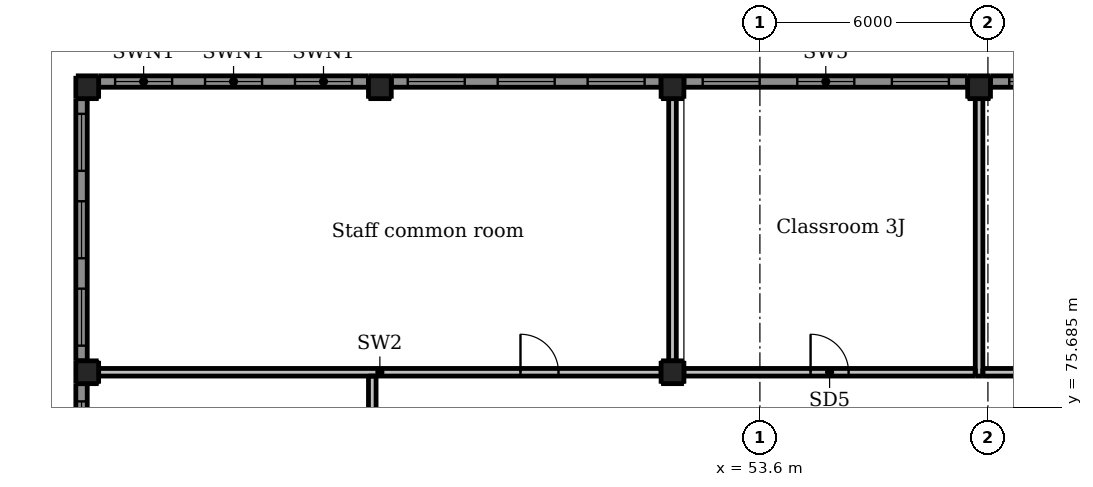
"""IFC4 building model, lengths in metres.
Left out: names, types, materials, properties, quantities, classifications, styles, units other than length and angle.
Written with IfcOpenShell. Run it as: python <this file> out.ifc"""

import sys

from ifc_helpers import new_model, si_unit, direction, frame, frame_2d, origin, origin_2d, place, context, subcontext, project, spatial, rectangle, extrude, element, fill, save


model = new_model("IFC4")
c1 = context("Model", 3, precision=1e-05, world=origin(), true_north=direction((0.0, 1.0)))
c2 = subcontext(c1, "Body", "Model", "MODEL_VIEW")
j1 = project(units=[si_unit("LENGTHUNIT", "METRE"), si_unit("PLANEANGLEUNIT", "RADIAN")], contexts=[c1])
p1 = place(None, origin())
s1 = spatial("IfcSite", under=j1, at=p1, CompositionType="ELEMENT")
p2 = place(p1, origin())
s2 = spatial("IfcBuilding", under=s1, at=p2, CompositionType="ELEMENT")
p3 = place(p2, frame((0.0, 0.0, 14.5)))
s3 = spatial("IfcBuildingStorey", under=s2, at=p3, CompositionType="ELEMENT", Elevation=14.5)
for number, where, z_axis, x_axis in (
    (1, (35.9, 76.6, -0.3), (0.0, 0.0, 1.0), (1.0, 0.0, 0.0)),
    (2, (51.3, 76.6, -0.3), (0.0, 0.0, 1.0), (1.0, 0.0, 0.0)),
    (3, (35.9, 84.1, -0.3), (0.0, 0.0, 1.0), (1.0, 0.0, 0.0)),
    (4, (51.3, 84.1, -0.3), (0.0, 0.0, 1.0), (1.0, 0.0, 0.0)),
    (5, (43.6, 84.1, -0.3), (0.0, 0.0, 1.0), (1.0, 0.0, 0.0)),
    (6, (59.367, 84.1, -0.3), (0.0, 0.0, 1.0), (1.0, 0.0, 0.0)),
):
    element("IfcColumn", number, at=place(p3, frame(where, z_axis=z_axis, x_axis=x_axis)), inside=s3, PredefinedType="COLUMN", context=c2, shape_type="SweptSolid", body=[
        extrude(rectangle(XDim=0.6, YDim=0.6, at=origin_2d()), origin(), (0.0, 0.0, 1.0), 4.5),
    ])
p4 = place(p3, frame((35.75, 69.0, 0.0), z_axis=(0.0, 0.0, 1.0), x_axis=(0.0, 1.0, 0.0)))
e7 = element("IfcWall", 7, at=p4, inside=s3, PredefinedType="SOLIDWALL", context=c2, shape_type="SweptSolid", body=[
    extrude(rectangle(XDim=7.3, YDim=0.3, at=frame_2d((3.65, 0.0))), origin(), (0.0, 0.0, 1.0), 3.3),
])
p5 = place(p4, frame((0.467, 0.0, 0.9)))
e8 = element("IfcOpeningElement", 8, at=p5, cuts=e7, PredefinedType="OPENING", context=c2, shape_type="SweptSolid", body=[
    extrude(rectangle(XDim=1.5, YDim=1.5, at=frame_2d((0.75, 0.75))), frame((0.0, 0.16, 0.0), z_axis=(0.0, -1.0, 0.0), x_axis=(1.0, 0.0, 0.0)), (0.0, 0.0, 1.0), 0.32),
])
p6 = place(p4, frame((2.9, 0.0, 0.9)))
e9 = element("IfcOpeningElement", 9, at=p6, cuts=e7, PredefinedType="OPENING", context=c2, shape_type="SweptSolid", body=[
    extrude(rectangle(XDim=1.5, YDim=1.5, at=frame_2d((0.75, 0.75))), frame((0.0, 0.16, 0.0), z_axis=(0.0, -1.0, 0.0), x_axis=(1.0, 0.0, 0.0)), (0.0, 0.0, 1.0), 0.32),
])
p7 = place(p4, frame((5.333, 0.0, 0.9)))
e10 = element("IfcOpeningElement", 10, at=p7, cuts=e7, PredefinedType="OPENING", context=c2, shape_type="SweptSolid", body=[
    extrude(rectangle(XDim=1.5, YDim=1.5, at=frame_2d((0.75, 0.75))), frame((0.0, 0.16, 0.0), z_axis=(0.0, -1.0, 0.0), x_axis=(1.0, 0.0, 0.0)), (0.0, 0.0, 1.0), 0.32),
])
p8 = place(p3, frame((35.75, 76.9, 0.0), z_axis=(0.0, 0.0, 1.0), x_axis=(0.0, 1.0, 0.0)))
e11 = element("IfcWall", 11, at=p8, inside=s3, PredefinedType="SOLIDWALL", context=c2, shape_type="SweptSolid", body=[
    extrude(rectangle(XDim=6.9, YDim=0.3, at=frame_2d((3.45, 0.0))), origin(), (0.0, 0.0, 1.0), 3.3),
])
p9 = place(p8, frame((0.4, 0.0, 0.9)))
e12 = element("IfcOpeningElement", 12, at=p9, cuts=e11, PredefinedType="OPENING", context=c2, shape_type="SweptSolid", body=[
    extrude(rectangle(XDim=1.5, YDim=1.5, at=frame_2d((0.75, 0.75))), frame((0.0, 0.16, 0.0), z_axis=(0.0, -1.0, 0.0), x_axis=(1.0, 0.0, 0.0)), (0.0, 0.0, 1.0), 0.32),
])
p10 = place(p8, frame((2.7, 0.0, 0.9)))
e13 = element("IfcOpeningElement", 13, at=p10, cuts=e11, PredefinedType="OPENING", context=c2, shape_type="SweptSolid", body=[
    extrude(rectangle(XDim=1.5, YDim=1.5, at=frame_2d((0.75, 0.75))), frame((0.0, 0.16, 0.0), z_axis=(0.0, -1.0, 0.0), x_axis=(1.0, 0.0, 0.0)), (0.0, 0.0, 1.0), 0.32),
])
p11 = place(p8, frame((5.0, 0.0, 0.9)))
e14 = element("IfcOpeningElement", 14, at=p11, cuts=e11, PredefinedType="OPENING", context=c2, shape_type="SweptSolid", body=[
    extrude(rectangle(XDim=1.5, YDim=1.5, at=frame_2d((0.75, 0.75))), frame((0.0, 0.16, 0.0), z_axis=(0.0, -1.0, 0.0), x_axis=(1.0, 0.0, 0.0)), (0.0, 0.0, 1.0), 0.32),
])
p12 = place(p3, frame((36.2, 84.25, 0.0), z_axis=(0.0, 0.0, 1.0), x_axis=(1.0, 0.0, 0.0)))
e15 = element("IfcWall", 15, at=p12, inside=s3, PredefinedType="SOLIDWALL", context=c2, shape_type="SweptSolid", body=[
    extrude(rectangle(XDim=7.1, YDim=0.3, at=frame_2d((3.55, 0.0))), origin(), (0.0, 0.0, 1.0), 3.3),
])
p13 = place(p12, frame((0.433, 0.0, 0.9)))
e16 = element("IfcOpeningElement", 16, at=p13, cuts=e15, PredefinedType="OPENING", context=c2, shape_type="SweptSolid", body=[
    extrude(rectangle(XDim=1.5, YDim=1.5, at=frame_2d((0.75, 0.75))), frame((0.0, 0.16, 0.0), z_axis=(0.0, -1.0, 0.0), x_axis=(1.0, 0.0, 0.0)), (0.0, 0.0, 1.0), 0.32),
])
p14 = place(p12, frame((2.8, 0.0, 0.9)))
e17 = element("IfcOpeningElement", 17, at=p14, cuts=e15, PredefinedType="OPENING", context=c2, shape_type="SweptSolid", body=[
    extrude(rectangle(XDim=1.5, YDim=1.5, at=frame_2d((0.75, 0.75))), frame((0.0, 0.16, 0.0), z_axis=(0.0, -1.0, 0.0), x_axis=(1.0, 0.0, 0.0)), (0.0, 0.0, 1.0), 0.32),
])
p15 = place(p12, frame((5.167, 0.0, 0.9)))
e18 = element("IfcOpeningElement", 18, at=p15, cuts=e15, PredefinedType="OPENING", context=c2, shape_type="SweptSolid", body=[
    extrude(rectangle(XDim=1.5, YDim=1.5, at=frame_2d((0.75, 0.75))), frame((0.0, 0.16, 0.0), z_axis=(0.0, -1.0, 0.0), x_axis=(1.0, 0.0, 0.0)), (0.0, 0.0, 1.0), 0.32),
])
p16 = place(p3, frame((43.9, 84.25, 0.0), z_axis=(0.0, 0.0, 1.0), x_axis=(1.0, 0.0, 0.0)))
e19 = element("IfcWall", 19, at=p16, inside=s3, PredefinedType="SOLIDWALL", context=c2, shape_type="SweptSolid", body=[
    extrude(rectangle(XDim=7.1, YDim=0.3, at=frame_2d((3.55, 0.0))), origin(), (0.0, 0.0, 1.0), 3.3),
])
p17 = place(p16, frame((0.433, 0.0, 0.9)))
e20 = element("IfcOpeningElement", 20, at=p17, cuts=e19, PredefinedType="OPENING", context=c2, shape_type="SweptSolid", body=[
    extrude(rectangle(XDim=1.5, YDim=1.5, at=frame_2d((0.75, 0.75))), frame((0.0, 0.16, 0.0), z_axis=(0.0, -1.0, 0.0), x_axis=(1.0, 0.0, 0.0)), (0.0, 0.0, 1.0), 0.32),
])
p18 = place(p16, frame((2.8, 0.0, 0.9)))
e21 = element("IfcOpeningElement", 21, at=p18, cuts=e19, PredefinedType="OPENING", context=c2, shape_type="SweptSolid", body=[
    extrude(rectangle(XDim=1.5, YDim=1.5, at=frame_2d((0.75, 0.75))), frame((0.0, 0.16, 0.0), z_axis=(0.0, -1.0, 0.0), x_axis=(1.0, 0.0, 0.0)), (0.0, 0.0, 1.0), 0.32),
])
p19 = place(p16, frame((5.167, 0.0, 0.9)))
e22 = element("IfcOpeningElement", 22, at=p19, cuts=e19, PredefinedType="OPENING", context=c2, shape_type="SweptSolid", body=[
    extrude(rectangle(XDim=1.5, YDim=1.5, at=frame_2d((0.75, 0.75))), frame((0.0, 0.16, 0.0), z_axis=(0.0, -1.0, 0.0), x_axis=(1.0, 0.0, 0.0)), (0.0, 0.0, 1.0), 0.32),
])
p20 = place(p3, frame((51.6, 84.25, 0.0), z_axis=(0.0, 0.0, 1.0), x_axis=(1.0, 0.0, 0.0)))
e23 = element("IfcWall", 23, at=p20, inside=s3, PredefinedType="SOLIDWALL", context=c2, shape_type="SweptSolid", body=[
    extrude(rectangle(XDim=7.467, YDim=0.3, at=frame_2d((3.733, 0.0))), origin(), (0.0, 0.0, 1.0), 3.3),
])
p21 = place(p20, frame((0.494, 0.0, 0.9)))
e24 = element("IfcOpeningElement", 24, at=p21, cuts=e23, PredefinedType="OPENING", context=c2, shape_type="SweptSolid", body=[
    extrude(rectangle(XDim=1.5, YDim=1.5, at=frame_2d((0.75, 0.75))), frame((0.0, 0.16, 0.0), z_axis=(0.0, -1.0, 0.0), x_axis=(1.0, 0.0, 0.0)), (0.0, 0.0, 1.0), 0.32),
])
p22 = place(p20, frame((2.983, 0.0, 0.9)))
e25 = element("IfcOpeningElement", 25, at=p22, cuts=e23, PredefinedType="OPENING", context=c2, shape_type="SweptSolid", body=[
    extrude(rectangle(XDim=1.5, YDim=1.5, at=frame_2d((0.75, 0.75))), frame((0.0, 0.16, 0.0), z_axis=(0.0, -1.0, 0.0), x_axis=(1.0, 0.0, 0.0)), (0.0, 0.0, 1.0), 0.32),
])
p23 = place(p20, frame((5.472, 0.0, 0.9)))
e26 = element("IfcOpeningElement", 26, at=p23, cuts=e23, PredefinedType="OPENING", context=c2, shape_type="SweptSolid", body=[
    extrude(rectangle(XDim=1.5, YDim=1.5, at=frame_2d((0.75, 0.75))), frame((0.0, 0.16, 0.0), z_axis=(0.0, -1.0, 0.0), x_axis=(1.0, 0.0, 0.0)), (0.0, 0.0, 1.0), 0.32),
])
p24 = place(p3, frame((59.667, 84.25, 0.0), z_axis=(0.0, 0.0, 1.0), x_axis=(1.0, 0.0, 0.0)))
e27 = element("IfcWall", 27, at=p24, inside=s3, PredefinedType="SOLIDWALL", context=c2, shape_type="SweptSolid", body=[
    extrude(rectangle(XDim=7.466, YDim=0.3, at=frame_2d((3.733, 0.0))), origin(), (0.0, 0.0, 1.0), 3.3),
])
p25 = place(p24, frame((0.494, 0.0, 0.9)))
e28 = element("IfcOpeningElement", 28, at=p25, cuts=e27, PredefinedType="OPENING", context=c2, shape_type="SweptSolid", body=[
    extrude(rectangle(XDim=1.5, YDim=1.5, at=frame_2d((0.75, 0.75))), frame((0.0, 0.16, 0.0), z_axis=(0.0, -1.0, 0.0), x_axis=(1.0, 0.0, 0.0)), (0.0, 0.0, 1.0), 0.32),
])
p26 = place(p24, frame((2.983, 0.0, 0.9)))
e29 = element("IfcOpeningElement", 29, at=p26, cuts=e27, PredefinedType="OPENING", context=c2, shape_type="SweptSolid", body=[
    extrude(rectangle(XDim=1.5, YDim=1.5, at=frame_2d((0.75, 0.75))), frame((0.0, 0.16, 0.0), z_axis=(0.0, -1.0, 0.0), x_axis=(1.0, 0.0, 0.0)), (0.0, 0.0, 1.0), 0.32),
])
p27 = place(p24, frame((5.472, 0.0, 0.9)))
e30 = element("IfcOpeningElement", 30, at=p27, cuts=e27, PredefinedType="OPENING", context=c2, shape_type="SweptSolid", body=[
    extrude(rectangle(XDim=1.5, YDim=1.5, at=frame_2d((0.75, 0.75))), frame((0.0, 0.16, 0.0), z_axis=(0.0, -1.0, 0.0), x_axis=(1.0, 0.0, 0.0)), (0.0, 0.0, 1.0), 0.32),
])
p28 = place(p3, frame((43.4, 68.8, 0.0), z_axis=(0.0, 0.0, 1.0), x_axis=(0.0, 1.0, 0.0)))
e31 = element("IfcWall", 31, at=p28, inside=s3, PredefinedType="PARTITIONING", context=c2, shape_type="SweptSolid", body=[
    extrude(rectangle(XDim=7.7, YDim=0.2, at=frame_2d((3.85, 0.0))), origin(), (0.0, 0.0, 1.0), 3.1),
])
p29 = place(p28, frame((3.35, 0.0, 0.0)))
e32 = element("IfcOpeningElement", 32, at=p29, cuts=e31, PredefinedType="OPENING", context=c2, shape_type="SweptSolid", body=[
    extrude(rectangle(XDim=1.0, YDim=2.1, at=frame_2d((0.5, 1.05))), frame((0.0, 0.11, 0.0), z_axis=(0.0, -1.0, 0.0), x_axis=(1.0, 0.0, 0.0)), (0.0, 0.0, 1.0), 0.22),
])
p30 = place(p3, frame((36.2, 76.6, 0.0), z_axis=(0.0, 0.0, 1.0), x_axis=(1.0, 0.0, 0.0)))
e33 = element("IfcWall", 33, at=p30, inside=s3, PredefinedType="PARTITIONING", context=c2, shape_type="SweptSolid", body=[
    extrude(rectangle(XDim=14.8, YDim=0.2, at=frame_2d((7.4, 0.0))), origin(), (0.0, 0.0, 1.0), 3.1),
])
p31 = place(p30, frame((11.1, 0.0, 0.0)))
e34 = element("IfcOpeningElement", 34, at=p31, cuts=e33, PredefinedType="OPENING", context=c2, shape_type="SweptSolid", body=[
    extrude(rectangle(XDim=1.0, YDim=2.1, at=frame_2d((0.5, 1.05))), frame((0.0, 0.11, 0.0), z_axis=(0.0, -1.0, 0.0), x_axis=(1.0, 0.0, 0.0)), (0.0, 0.0, 1.0), 0.22),
])
p32 = place(p3, frame((51.3, 76.9, 0.0), z_axis=(0.0, 0.0, 1.0), x_axis=(0.0, 1.0, 0.0)))
e35 = element("IfcWall", 35, at=p32, inside=s3, PredefinedType="PARTITIONING", context=c2, shape_type="SweptSolid", body=[
    extrude(rectangle(XDim=6.9, YDim=0.2, at=frame_2d((3.45, 0.0))), origin(), (0.0, 0.0, 1.0), 3.1),
])
p33 = place(p3, frame((51.6, 76.6, 0.0), z_axis=(0.0, 0.0, 1.0), x_axis=(1.0, 0.0, 0.0)))
e36 = element("IfcWall", 36, at=p33, inside=s3, PredefinedType="PARTITIONING", context=c2, shape_type="SweptSolid", body=[
    extrude(rectangle(XDim=7.667, YDim=0.2, at=frame_2d((3.833, 0.0))), origin(), (0.0, 0.0, 1.0), 3.1),
])
p34 = place(p33, frame((3.333, 0.0, 0.0)))
e37 = element("IfcOpeningElement", 37, at=p34, cuts=e36, PredefinedType="OPENING", context=c2, shape_type="SweptSolid", body=[
    extrude(rectangle(XDim=1.0, YDim=2.1, at=frame_2d((0.5, 1.05))), frame((0.0, 0.11, 0.0), z_axis=(0.0, -1.0, 0.0), x_axis=(1.0, 0.0, 0.0)), (0.0, 0.0, 1.0), 0.22),
])
p35 = place(p3, frame((59.467, 76.6, 0.0), z_axis=(0.0, 0.0, 1.0), x_axis=(1.0, 0.0, 0.0)))
e38 = element("IfcWall", 38, at=p35, inside=s3, PredefinedType="PARTITIONING", context=c2, shape_type="SweptSolid", body=[
    extrude(rectangle(XDim=7.866, YDim=0.2, at=frame_2d((3.933, 0.0))), origin(), (0.0, 0.0, 1.0), 3.1),
])
p36 = place(p35, frame((3.433, 0.0, 0.0)))
e39 = element("IfcOpeningElement", 39, at=p36, cuts=e38, PredefinedType="OPENING", context=c2, shape_type="SweptSolid", body=[
    extrude(rectangle(XDim=1.0, YDim=2.1, at=frame_2d((0.5, 1.05))), frame((0.0, 0.11, 0.0), z_axis=(0.0, -1.0, 0.0), x_axis=(1.0, 0.0, 0.0)), (0.0, 0.0, 1.0), 0.22),
])
p37 = place(p3, frame((59.367, 76.5, 0.0), z_axis=(0.0, 0.0, 1.0), x_axis=(0.0, 1.0, 0.0)))
e40 = element("IfcWall", 40, at=p37, inside=s3, PredefinedType="PARTITIONING", context=c2, shape_type="SweptSolid", body=[
    extrude(rectangle(XDim=7.3, YDim=0.2, at=frame_2d((3.65, 0.0))), origin(), (0.0, 0.0, 1.0), 3.1),
])
p38 = place(p7, origin())
e41 = element("IfcWindow", 41, at=p38, inside=s3, PartitioningType="DOUBLE_PANEL_HORIZONTAL", PredefinedType="WINDOW", context=c2, shape_type="SweptSolid", body=[
    extrude(rectangle(XDim=1.5, YDim=1.5, at=frame_2d((0.75, 0.75))), frame((0.0, 0.03, 0.0), z_axis=(0.0, -1.0, 0.0), x_axis=(1.0, 0.0, 0.0)), (0.0, 0.0, 1.0), 0.06),
])
fill(e10, e41)
p39 = place(p9, origin())
e42 = element("IfcWindow", 42, at=p39, inside=s3, PartitioningType="DOUBLE_PANEL_HORIZONTAL", PredefinedType="WINDOW", context=c2, shape_type="SweptSolid", body=[
    extrude(rectangle(XDim=1.5, YDim=1.5, at=frame_2d((0.75, 0.75))), frame((0.0, 0.03, 0.0), z_axis=(0.0, -1.0, 0.0), x_axis=(1.0, 0.0, 0.0)), (0.0, 0.0, 1.0), 0.06),
])
fill(e12, e42)
p40 = place(p10, origin())
e43 = element("IfcWindow", 43, at=p40, inside=s3, PartitioningType="DOUBLE_PANEL_HORIZONTAL", PredefinedType="WINDOW", context=c2, shape_type="SweptSolid", body=[
    extrude(rectangle(XDim=1.5, YDim=1.5, at=frame_2d((0.75, 0.75))), frame((0.0, 0.03, 0.0), z_axis=(0.0, -1.0, 0.0), x_axis=(1.0, 0.0, 0.0)), (0.0, 0.0, 1.0), 0.06),
])
fill(e13, e43)
p41 = place(p11, origin())
e44 = element("IfcWindow", 44, at=p41, inside=s3, PartitioningType="DOUBLE_PANEL_HORIZONTAL", PredefinedType="WINDOW", context=c2, shape_type="SweptSolid", body=[
    extrude(rectangle(XDim=1.5, YDim=1.5, at=frame_2d((0.75, 0.75))), frame((0.0, 0.03, 0.0), z_axis=(0.0, -1.0, 0.0), x_axis=(1.0, 0.0, 0.0)), (0.0, 0.0, 1.0), 0.06),
])
fill(e14, e44)
p42 = place(p13, origin())
e45 = element("IfcWindow", 45, at=p42, inside=s3, PartitioningType="DOUBLE_PANEL_HORIZONTAL", PredefinedType="WINDOW", context=c2, shape_type="SweptSolid", body=[
    extrude(rectangle(XDim=1.5, YDim=1.5, at=frame_2d((0.75, 0.75))), frame((0.0, 0.03, 0.0), z_axis=(0.0, -1.0, 0.0), x_axis=(1.0, 0.0, 0.0)), (0.0, 0.0, 1.0), 0.06),
])
fill(e16, e45)
p43 = place(p14, origin())
e46 = element("IfcWindow", 46, at=p43, inside=s3, PartitioningType="DOUBLE_PANEL_HORIZONTAL", PredefinedType="WINDOW", context=c2, shape_type="SweptSolid", body=[
    extrude(rectangle(XDim=1.5, YDim=1.5, at=frame_2d((0.75, 0.75))), frame((0.0, 0.03, 0.0), z_axis=(0.0, -1.0, 0.0), x_axis=(1.0, 0.0, 0.0)), (0.0, 0.0, 1.0), 0.06),
])
fill(e17, e46)
p44 = place(p15, origin())
e47 = element("IfcWindow", 47, at=p44, inside=s3, PartitioningType="DOUBLE_PANEL_HORIZONTAL", PredefinedType="WINDOW", context=c2, shape_type="SweptSolid", body=[
    extrude(rectangle(XDim=1.5, YDim=1.5, at=frame_2d((0.75, 0.75))), frame((0.0, 0.03, 0.0), z_axis=(0.0, -1.0, 0.0), x_axis=(1.0, 0.0, 0.0)), (0.0, 0.0, 1.0), 0.06),
])
fill(e18, e47)
p45 = place(p17, origin())
e48 = element("IfcWindow", 48, at=p45, inside=s3, PartitioningType="DOUBLE_PANEL_HORIZONTAL", PredefinedType="WINDOW", context=c2, shape_type="SweptSolid", body=[
    extrude(rectangle(XDim=1.5, YDim=1.5, at=frame_2d((0.75, 0.75))), frame((0.0, 0.03, 0.0), z_axis=(0.0, -1.0, 0.0), x_axis=(1.0, 0.0, 0.0)), (0.0, 0.0, 1.0), 0.06),
])
fill(e20, e48)
p46 = place(p18, origin())
e49 = element("IfcWindow", 49, at=p46, inside=s3, PartitioningType="DOUBLE_PANEL_HORIZONTAL", PredefinedType="WINDOW", context=c2, shape_type="SweptSolid", body=[
    extrude(rectangle(XDim=1.5, YDim=1.5, at=frame_2d((0.75, 0.75))), frame((0.0, 0.03, 0.0), z_axis=(0.0, -1.0, 0.0), x_axis=(1.0, 0.0, 0.0)), (0.0, 0.0, 1.0), 0.06),
])
fill(e21, e49)
p47 = place(p19, origin())
e50 = element("IfcWindow", 50, at=p47, inside=s3, PartitioningType="DOUBLE_PANEL_HORIZONTAL", PredefinedType="WINDOW", context=c2, shape_type="SweptSolid", body=[
    extrude(rectangle(XDim=1.5, YDim=1.5, at=frame_2d((0.75, 0.75))), frame((0.0, 0.03, 0.0), z_axis=(0.0, -1.0, 0.0), x_axis=(1.0, 0.0, 0.0)), (0.0, 0.0, 1.0), 0.06),
])
fill(e22, e50)
p48 = place(p21, origin())
e51 = element("IfcWindow", 51, at=p48, inside=s3, PartitioningType="DOUBLE_PANEL_HORIZONTAL", PredefinedType="WINDOW", context=c2, shape_type="SweptSolid", body=[
    extrude(rectangle(XDim=1.5, YDim=1.5, at=frame_2d((0.75, 0.75))), frame((0.0, 0.03, 0.0), z_axis=(0.0, -1.0, 0.0), x_axis=(1.0, 0.0, 0.0)), (0.0, 0.0, 1.0), 0.06),
])
fill(e24, e51)
p49 = place(p22, origin())
e52 = element("IfcWindow", 52, at=p49, inside=s3, PartitioningType="DOUBLE_PANEL_HORIZONTAL", PredefinedType="WINDOW", context=c2, shape_type="SweptSolid", body=[
    extrude(rectangle(XDim=1.5, YDim=1.5, at=frame_2d((0.75, 0.75))), frame((0.0, 0.03, 0.0), z_axis=(0.0, -1.0, 0.0), x_axis=(1.0, 0.0, 0.0)), (0.0, 0.0, 1.0), 0.06),
])
fill(e25, e52)
p50 = place(p23, origin())
e53 = element("IfcWindow", 53, at=p50, inside=s3, PartitioningType="DOUBLE_PANEL_HORIZONTAL", PredefinedType="WINDOW", context=c2, shape_type="SweptSolid", body=[
    extrude(rectangle(XDim=1.5, YDim=1.5, at=frame_2d((0.75, 0.75))), frame((0.0, 0.03, 0.0), z_axis=(0.0, -1.0, 0.0), x_axis=(1.0, 0.0, 0.0)), (0.0, 0.0, 1.0), 0.06),
])
fill(e26, e53)
p51 = place(p25, origin())
e54 = element("IfcWindow", 54, at=p51, inside=s3, PartitioningType="DOUBLE_PANEL_HORIZONTAL", PredefinedType="WINDOW", context=c2, shape_type="SweptSolid", body=[
    extrude(rectangle(XDim=1.5, YDim=1.5, at=frame_2d((0.75, 0.75))), frame((0.0, 0.03, 0.0), z_axis=(0.0, -1.0, 0.0), x_axis=(1.0, 0.0, 0.0)), (0.0, 0.0, 1.0), 0.06),
])
fill(e28, e54)
p52 = place(p31, origin())
e55 = element("IfcDoor", 55, at=p52, inside=s3, OperationType="SINGLE_SWING_LEFT", PredefinedType="DOOR", context=c2, shape_type="SweptSolid", body=[
    extrude(rectangle(XDim=1.0, YDim=2.1, at=frame_2d((0.5, 1.05))), frame((0.0, 0.025, 0.0), z_axis=(0.0, -1.0, 0.0), x_axis=(1.0, 0.0, 0.0)), (0.0, 0.0, 1.0), 0.05),
])
fill(e34, e55)
p53 = place(p34, origin())
e56 = element("IfcDoor", 56, at=p53, inside=s3, OperationType="SINGLE_SWING_LEFT", PredefinedType="DOOR", context=c2, shape_type="SweptSolid", body=[
    extrude(rectangle(XDim=1.0, YDim=2.1, at=frame_2d((0.5, 1.05))), frame((0.0, 0.025, 0.0), z_axis=(0.0, -1.0, 0.0), x_axis=(1.0, 0.0, 0.0)), (0.0, 0.0, 1.0), 0.05),
])
fill(e37, e56)
save(model, sys.argv[1])
